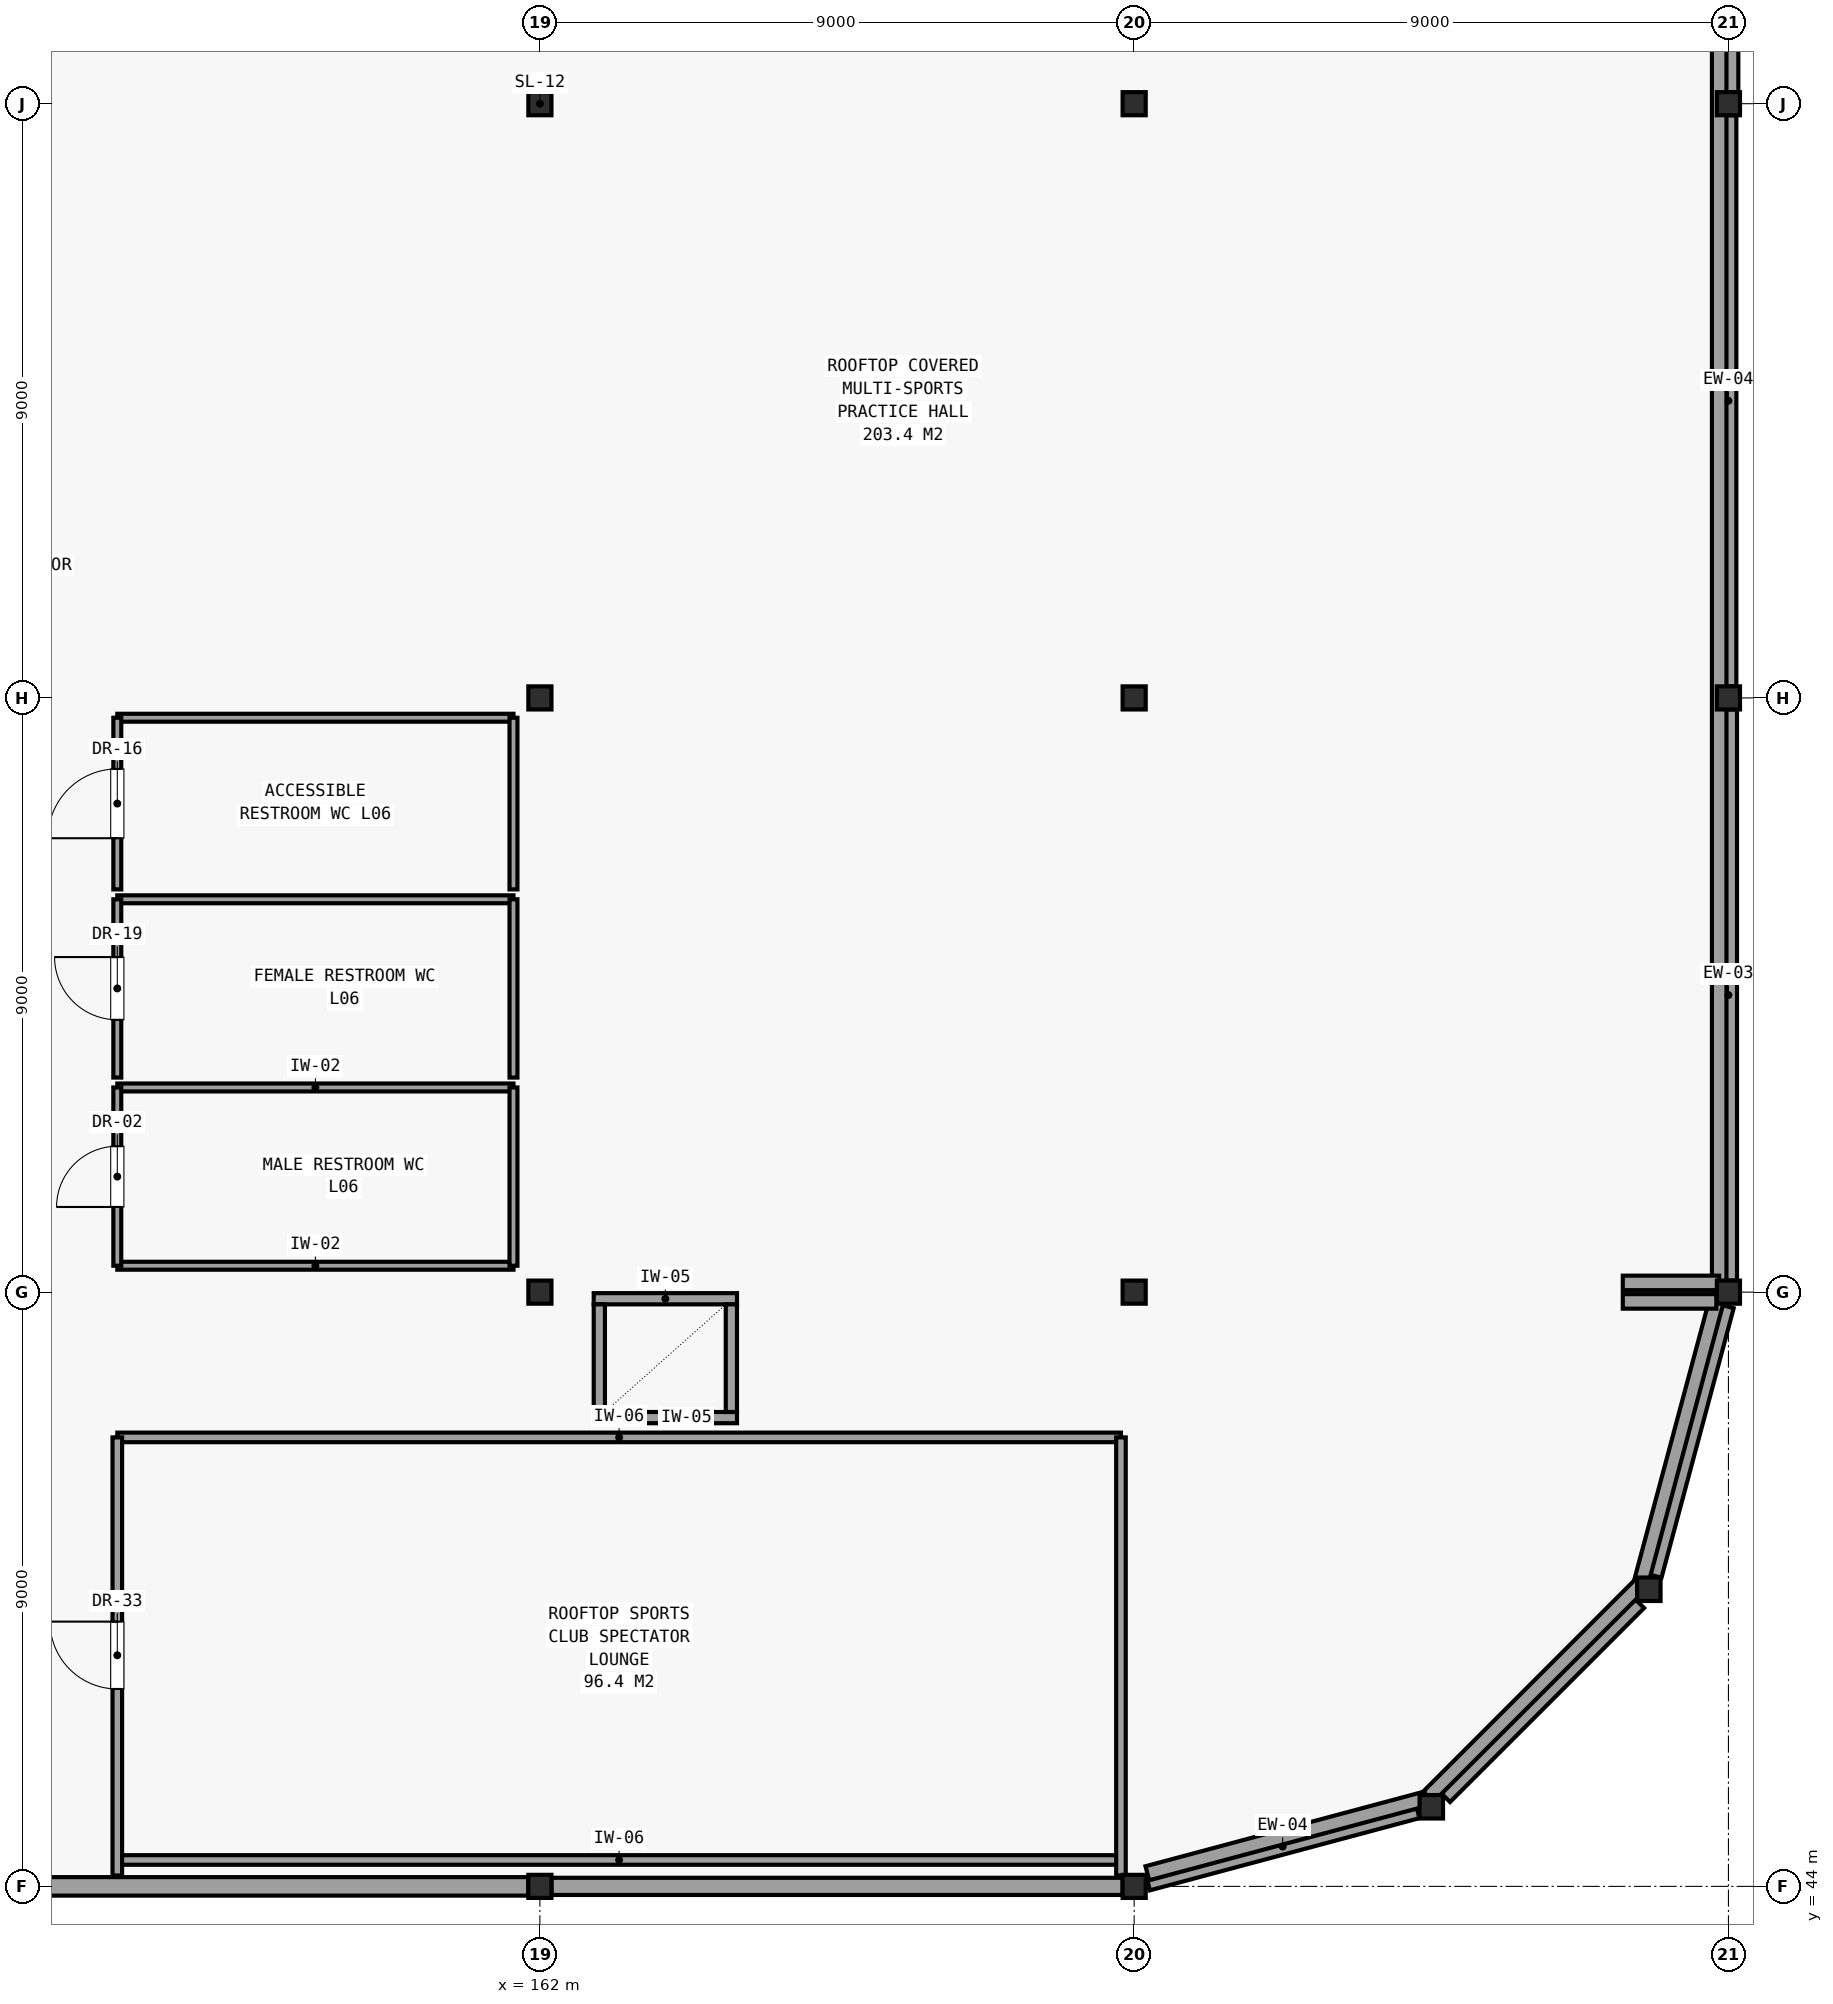
"""IFC4 building model, lengths in metres.
Left out: names, types, materials, properties, quantities, classifications, styles, units other than length and angle.
Written with IfcOpenShell. Run it as: python <this file> out.ifc"""

import sys

from ifc_helpers import new_model, si_unit, direction, frame, frame_2d, origin, origin_2d, place, context, subcontext, project, spatial, rectangle, hollow_rectangle, hollow_circle, extrude, element, fill, save


model = new_model("IFC4")
c1 = context("Model", 3, precision=1e-05, world=origin(), true_north=direction((0.0, 1.0)))
c2 = subcontext(c1, "Body", "Model", "MODEL_VIEW")
j1 = project(units=[si_unit("LENGTHUNIT", "METRE"), si_unit("PLANEANGLEUNIT", "RADIAN")], contexts=[c1])
p1 = place(None, origin())
s1 = spatial("IfcSite", under=j1, at=p1, CompositionType="ELEMENT")
p2 = place(p1, origin())
s2 = spatial("IfcBuilding", under=s1, at=p2, CompositionType="ELEMENT")
p3 = place(p2, frame((0.0, 0.0, 26.1)))
s3 = spatial("IfcBuildingStorey", under=s2, at=p3, CompositionType="ELEMENT", Elevation=26.1)
for number, where, z_axis, x_axis in (
    (1, (162.0, 44.0, 0.0), (0.0, 0.0, 1.0), (1.0, 0.0, 0.0)),
    (2, (162.0, 53.0, 0.0), (0.0, 0.0, 1.0), (1.0, 0.0, 0.0)),
    (3, (162.0, 62.0, 0.0), (0.0, 0.0, 1.0), (1.0, 0.0, 0.0)),
    (4, (162.0, 71.0, 0.0), (0.0, 0.0, 1.0), (1.0, 0.0, 0.0)),
    (5, (171.0, 44.0, 0.0), (0.0, 0.0, 1.0), (1.0, 0.0, 0.0)),
    (6, (171.0, 53.0, 0.0), (0.0, 0.0, 1.0), (1.0, 0.0, 0.0)),
    (7, (171.0, 62.0, 0.0), (0.0, 0.0, 1.0), (1.0, 0.0, 0.0)),
    (8, (171.0, 71.0, 0.0), (0.0, 0.0, 1.0), (1.0, 0.0, 0.0)),
):
    element("IfcColumn", number, at=place(p3, frame(where, z_axis=z_axis, x_axis=x_axis)), inside=s3, PredefinedType="COLUMN", context=c2, shape_type="SweptSolid", body=[
        extrude(hollow_rectangle(XDim=0.35, YDim=0.35, WallThickness=0.016, at=origin_2d()), origin(), (0.0, 0.0, 1.0), 4.14),
    ])
for number, where, z_axis, x_axis in (
    (9, (175.5, 45.206, 0.0), (0.0, 0.0, 1.0), (1.0, 0.0, 0.0)),
    (10, (178.794, 48.5, 0.0), (0.0, 0.0, 1.0), (1.0, 0.0, 0.0)),
):
    element("IfcColumn", number, at=place(p3, frame(where, z_axis=z_axis, x_axis=x_axis)), inside=s3, PredefinedType="COLUMN", context=c2, shape_type="SweptSolid", body=[
        extrude(hollow_circle(Radius=0.178, WallThickness=0.013, at=origin_2d()), origin(), (0.0, 0.0, 1.0), 4.14),
    ])
for number, where, z_axis, x_axis in (
    (11, (180.0, 53.0, 0.0), (0.0, 0.0, 1.0), (1.0, 0.0, 0.0)),
    (12, (180.0, 62.0, 0.0), (0.0, 0.0, 1.0), (1.0, 0.0, 0.0)),
    (13, (180.0, 71.0, 0.0), (0.0, 0.0, 1.0), (1.0, 0.0, 0.0)),
):
    element("IfcColumn", number, at=place(p3, frame(where, z_axis=z_axis, x_axis=x_axis)), inside=s3, PredefinedType="COLUMN", context=c2, shape_type="SweptSolid", body=[
        extrude(hollow_rectangle(XDim=0.35, YDim=0.35, WallThickness=0.016, at=origin_2d()), origin(), (0.0, 0.0, 1.0), 4.14),
    ])
p4 = place(p3, frame((153.175, 44.0, 0.0), z_axis=(0.0, 0.0, 1.0), x_axis=(1.0, 0.0, 0.0)))
e14 = element("IfcWall", 14, at=p4, inside=s3, PredefinedType="SOLIDWALL", context=c2, shape_type="SweptSolid", body=[
    extrude(rectangle(XDim=8.65, YDim=0.28, at=frame_2d((4.325, 0.0))), origin(), (0.0, 0.0, 1.0), 3.34),
])
p5 = place(p3, frame((162.175, 44.0, 0.0), z_axis=(0.0, 0.0, 1.0), x_axis=(1.0, 0.0, 0.0)))
e15 = element("IfcWall", 15, at=p5, inside=s3, PredefinedType="SOLIDWALL", context=c2, shape_type="SweptSolid", body=[
    extrude(rectangle(XDim=8.65, YDim=0.26, at=frame_2d((4.325, 0.0))), origin(), (0.0, 0.0, 1.0), 3.34),
])
p6 = place(p3, frame((171.207, 44.055, 0.0), z_axis=(0.0, 0.0, 1.0), x_axis=(0.965924589415, 0.258823661135, 0.0)))
e16 = element("IfcWall", 16, at=p6, inside=s3, PredefinedType="SOLIDWALL", context=c2, shape_type="SweptSolid", body=[
    extrude(rectangle(XDim=4.227, YDim=0.24, at=frame_2d((2.113, 0.0))), origin(), (0.0, 0.0, 1.0), 3.34),
])
p7 = place(p3, frame((175.678, 45.384, 0.0), z_axis=(0.0, 0.0, 1.0), x_axis=(0.707106781187, 0.707106781187, 0.0)))
e17 = element("IfcWall", 17, at=p7, inside=s3, PredefinedType="SOLIDWALL", context=c2, shape_type="SweptSolid", body=[
    extrude(rectangle(XDim=4.156, YDim=0.3, at=frame_2d((2.078, 0.0))), origin(), (0.0, 0.0, 1.0), 3.34),
])
p8 = place(p3, frame((178.851, 48.71, 0.0), z_axis=(0.0, 0.0, 1.0), x_axis=(0.258823661135, 0.965924589415, 0.0)))
e18 = element("IfcWall", 18, at=p8, inside=s3, PredefinedType="SOLIDWALL", context=c2, shape_type="SweptSolid", body=[
    extrude(rectangle(XDim=4.227, YDim=0.28, at=frame_2d((2.113, 0.0))), origin(), (0.0, 0.0, 1.0), 3.34),
])
p9 = place(p3, frame((180.0, 53.175, 0.0), z_axis=(0.0, 0.0, 1.0), x_axis=(0.0, 1.0, 0.0)))
e19 = element("IfcWall", 19, at=p9, inside=s3, PredefinedType="SOLIDWALL", context=c2, shape_type="SweptSolid", body=[
    extrude(rectangle(XDim=8.65, YDim=0.26, at=frame_2d((4.325, 0.0))), origin(), (0.0, 0.0, 1.0), 3.34),
])
p10 = place(p3, frame((180.0, 62.175, 0.0), z_axis=(0.0, 0.0, 1.0), x_axis=(0.0, 1.0, 0.0)))
e20 = element("IfcWall", 20, at=p10, inside=s3, PredefinedType="SOLIDWALL", context=c2, shape_type="SweptSolid", body=[
    extrude(rectangle(XDim=8.65, YDim=0.24, at=frame_2d((4.325, 0.0))), origin(), (0.0, 0.0, 1.0), 3.34),
])
p11 = place(p3, frame((180.0, 71.175, 0.0), z_axis=(0.0, 0.0, 1.0), x_axis=(0.0, 1.0, 0.0)))
e21 = element("IfcWall", 21, at=p11, inside=s3, PredefinedType="SOLIDWALL", context=c2, shape_type="SweptSolid", body=[
    extrude(rectangle(XDim=8.65, YDim=0.3, at=frame_2d((4.325, 0.0))), origin(), (0.0, 0.0, 1.0), 3.34),
])
p12 = place(p3, frame((179.817, 52.86, 4.295), z_axis=(0.0, 0.0, 1.0), x_axis=(-0.258781905852, -0.965935776956, 0.0)))
e22 = element("IfcWall", 22, at=p12, inside=s3, PredefinedType="PARAPET", context=c2, shape_type="SweptSolid", body=[
    extrude(rectangle(XDim=4.439, YDim=0.22, at=frame_2d((2.219, 0.0))), origin(), (0.0, 0.0, 1.0), 0.425),
])
p13 = place(p3, frame((178.669, 48.573, 4.295), z_axis=(0.0, 0.0, 1.0), x_axis=(-0.707106781187, -0.707106781187, 0.0)))
e23 = element("IfcWall", 23, at=p13, inside=s3, PredefinedType="PARAPET", context=c2, shape_type="SweptSolid", body=[
    extrude(rectangle(XDim=4.584, YDim=0.22, at=frame_2d((2.292, 0.0))), origin(), (0.0, 0.0, 1.0), 0.425),
])
p14 = place(p3, frame((175.427, 45.331, 4.295), z_axis=(0.0, 0.0, 1.0), x_axis=(-0.96592315171, -0.258829026561, 0.0)))
e24 = element("IfcWall", 24, at=p14, inside=s3, PredefinedType="PARAPET", context=c2, shape_type="SweptSolid", body=[
    extrude(rectangle(XDim=4.377, YDim=0.22, at=frame_2d((2.188, 0.0))), origin(), (0.0, 0.0, 1.0), 0.425),
])
p15 = place(p3, frame((178.4, 52.86, 4.295), z_axis=(0.0, 0.0, 1.0), x_axis=(1.0, 0.0, 0.0)))
e25 = element("IfcWall", 25, at=p15, inside=s3, PredefinedType="PARAPET", context=c2, shape_type="SweptSolid", body=[
    extrude(rectangle(XDim=1.417, YDim=0.22, at=frame_2d((0.709, 0.0))), origin(), (0.0, 0.0, 1.0), 0.425),
])
p16 = place(p3, frame((179.86, 88.86, 4.295), z_axis=(0.0, 0.0, 1.0), x_axis=(0.0, -1.0, 0.0)))
e26 = element("IfcWall", 26, at=p16, inside=s3, PredefinedType="PARAPET", context=c2, shape_type="SweptSolid", body=[
    extrude(rectangle(XDim=35.72, YDim=0.22, at=frame_2d((17.86, 0.0))), origin(), (0.0, 0.0, 1.0), 0.425),
])
p17 = place(p3, frame((179.86, 53.14, 4.295), z_axis=(0.0, 0.0, 1.0), x_axis=(-1.0, 0.0, 0.0)))
e27 = element("IfcWall", 27, at=p17, inside=s3, PredefinedType="PARAPET", context=c2, shape_type="SweptSolid", body=[
    extrude(rectangle(XDim=1.46, YDim=0.22, at=frame_2d((0.73, 0.0))), origin(), (0.0, 0.0, 1.0), 0.425),
])
p18 = place(p3, frame((162.815, 51.1, 0.0), z_axis=(0.0, 0.0, 1.0), x_axis=(1.0, 0.0, 0.0)))
e28 = element("IfcWall", 28, at=p18, inside=s3, PredefinedType="PARTITIONING", context=c2, shape_type="SweptSolid", body=[
    extrude(rectangle(XDim=2.17, YDim=0.17, at=frame_2d((1.085, 0.0))), origin(), (0.0, 0.0, 1.0), 3.92),
])
p19 = place(p3, frame((162.815, 52.9, 0.0), z_axis=(0.0, 0.0, 1.0), x_axis=(1.0, 0.0, 0.0)))
e29 = element("IfcWall", 29, at=p19, inside=s3, PredefinedType="PARTITIONING", context=c2, shape_type="SweptSolid", body=[
    extrude(rectangle(XDim=2.17, YDim=0.17, at=frame_2d((1.085, 0.0))), origin(), (0.0, 0.0, 1.0), 3.581),
])
for number, where, z_axis, x_axis in (
    (30, (162.9, 51.185, 0.0), (0.0, 0.0, 1.0), (0.0, 1.0, 0.0)),
    (31, (164.9, 51.185, 0.0), (0.0, 0.0, 1.0), (0.0, 1.0, 0.0)),
):
    element("IfcWall", number, at=place(p3, frame(where, z_axis=z_axis, x_axis=x_axis)), inside=s3, PredefinedType="PARTITIONING", context=c2, shape_type="SweptSolid", body=[
        extrude(rectangle(XDim=1.63, YDim=0.17, at=frame_2d((0.815, 0.0))), origin(), (0.0, 0.0, 1.0), 3.581),
    ])
for number, where, z_axis, x_axis in (
    (32, (155.6, 53.4, 0.0), (0.0, 0.0, 1.0), (1.0, 0.0, 0.0)),
    (33, (155.6, 56.1, 0.0), (0.0, 0.0, 1.0), (1.0, 0.0, 0.0)),
):
    element("IfcWall", number, at=place(p3, frame(where, z_axis=z_axis, x_axis=x_axis)), inside=s3, PredefinedType="PARTITIONING", context=c2, shape_type="SweptSolid", body=[
        extrude(rectangle(XDim=6.0, YDim=0.12, at=frame_2d((3.0, 0.0))), origin(), (0.0, 0.0, 1.0), 3.94),
    ])
p20 = place(p3, frame((155.6, 53.4, 0.0), z_axis=(0.0, 0.0, 1.0), x_axis=(0.0, 1.0, 0.0)))
e34 = element("IfcWall", 34, at=p20, inside=s3, PredefinedType="PARTITIONING", context=c2, shape_type="SweptSolid", body=[
    extrude(rectangle(XDim=2.7, YDim=0.12, at=frame_2d((1.35, 0.0))), origin(), (0.0, 0.0, 1.0), 3.94),
])
p21 = place(p20, frame((0.89, 0.0, 0.0)))
e35 = element("IfcOpeningElement", 35, at=p21, cuts=e34, PredefinedType="OPENING", context=c2, shape_type="SweptSolid", body=[
    extrude(rectangle(XDim=0.92, YDim=2.1, at=frame_2d((0.46, 1.05))), frame((0.0, 0.071, 0.0), z_axis=(0.0, -1.0, 0.0), x_axis=(1.0, 0.0, 0.0)), (0.0, 0.0, 1.0), 0.142),
])
p22 = place(p3, frame((161.6, 53.4, 0.0), z_axis=(0.0, 0.0, 1.0), x_axis=(0.0, 1.0, 0.0)))
e36 = element("IfcWall", 36, at=p22, inside=s3, PredefinedType="PARTITIONING", context=c2, shape_type="SweptSolid", body=[
    extrude(rectangle(XDim=2.7, YDim=0.12, at=frame_2d((1.35, 0.0))), origin(), (0.0, 0.0, 1.0), 3.94),
])
p23 = place(p3, frame((155.6, 58.95, 0.0), z_axis=(0.0, 0.0, 1.0), x_axis=(1.0, 0.0, 0.0)))
e37 = element("IfcWall", 37, at=p23, inside=s3, PredefinedType="PARTITIONING", context=c2, shape_type="SweptSolid", body=[
    extrude(rectangle(XDim=6.0, YDim=0.12, at=frame_2d((3.0, 0.0))), origin(), (0.0, 0.0, 1.0), 3.94),
])
p24 = place(p3, frame((155.6, 56.25, 0.0), z_axis=(0.0, 0.0, 1.0), x_axis=(0.0, 1.0, 0.0)))
e38 = element("IfcWall", 38, at=p24, inside=s3, PredefinedType="PARTITIONING", context=c2, shape_type="SweptSolid", body=[
    extrude(rectangle(XDim=2.7, YDim=0.12, at=frame_2d((1.35, 0.0))), origin(), (0.0, 0.0, 1.0), 3.94),
])
p25 = place(p24, frame((0.875, 0.0, 0.0)))
e39 = element("IfcOpeningElement", 39, at=p25, cuts=e38, PredefinedType="OPENING", context=c2, shape_type="SweptSolid", body=[
    extrude(rectangle(XDim=0.95, YDim=2.15, at=frame_2d((0.475, 1.075))), frame((0.0, 0.071, 0.0), z_axis=(0.0, -1.0, 0.0), x_axis=(1.0, 0.0, 0.0)), (0.0, 0.0, 1.0), 0.142),
])
p26 = place(p3, frame((161.6, 56.25, 0.0), z_axis=(0.0, 0.0, 1.0), x_axis=(0.0, 1.0, 0.0)))
e40 = element("IfcWall", 40, at=p26, inside=s3, PredefinedType="PARTITIONING", context=c2, shape_type="SweptSolid", body=[
    extrude(rectangle(XDim=2.7, YDim=0.12, at=frame_2d((1.35, 0.0))), origin(), (0.0, 0.0, 1.0), 3.94),
])
p27 = place(p3, frame((155.6, 61.7, 0.0), z_axis=(0.0, 0.0, 1.0), x_axis=(1.0, 0.0, 0.0)))
e41 = element("IfcWall", 41, at=p27, inside=s3, PredefinedType="PARTITIONING", context=c2, shape_type="SweptSolid", body=[
    extrude(rectangle(XDim=6.0, YDim=0.12, at=frame_2d((3.0, 0.0))), origin(), (0.0, 0.0, 1.0), 3.94),
])
p28 = place(p3, frame((155.6, 59.1, 0.0), z_axis=(0.0, 0.0, 1.0), x_axis=(0.0, 1.0, 0.0)))
e42 = element("IfcWall", 42, at=p28, inside=s3, PredefinedType="PARTITIONING", context=c2, shape_type="SweptSolid", body=[
    extrude(rectangle(XDim=2.6, YDim=0.12, at=frame_2d((1.3, 0.0))), origin(), (0.0, 0.0, 1.0), 3.94),
])
p29 = place(p28, frame((0.775, 0.0, 0.0)))
e43 = element("IfcOpeningElement", 43, at=p29, cuts=e42, PredefinedType="OPENING", context=c2, shape_type="SweptSolid", body=[
    extrude(rectangle(XDim=1.05, YDim=2.2, at=frame_2d((0.525, 1.1))), frame((0.0, 0.071, 0.0), z_axis=(0.0, -1.0, 0.0), x_axis=(1.0, 0.0, 0.0)), (0.0, 0.0, 1.0), 0.142),
])
p30 = place(p3, frame((161.6, 59.1, 0.0), z_axis=(0.0, 0.0, 1.0), x_axis=(0.0, 1.0, 0.0)))
e44 = element("IfcWall", 44, at=p30, inside=s3, PredefinedType="PARTITIONING", context=c2, shape_type="SweptSolid", body=[
    extrude(rectangle(XDim=2.6, YDim=0.12, at=frame_2d((1.3, 0.0))), origin(), (0.0, 0.0, 1.0), 3.94),
])
for number, where, z_axis, x_axis in (
    (45, (155.6, 44.4, 0.0), (0.0, 0.0, 1.0), (1.0, 0.0, 0.0)),
    (46, (155.6, 50.8, 0.0), (0.0, 0.0, 1.0), (1.0, 0.0, 0.0)),
):
    element("IfcWall", number, at=place(p3, frame(where, z_axis=z_axis, x_axis=x_axis)), inside=s3, PredefinedType="PARTITIONING", context=c2, shape_type="SweptSolid", body=[
        extrude(rectangle(XDim=15.2, YDim=0.145, at=frame_2d((7.6, 0.0))), origin(), (0.0, 0.0, 1.0), 3.94),
    ])
p31 = place(p3, frame((155.6, 44.165, 0.0), z_axis=(0.0, 0.0, 1.0), x_axis=(0.0, 1.0, 0.0)))
e47 = element("IfcWall", 47, at=p31, inside=s3, PredefinedType="PARTITIONING", context=c2, shape_type="SweptSolid", body=[
    extrude(rectangle(XDim=6.635, YDim=0.145, at=frame_2d((3.317, 0.0))), origin(), (0.0, 0.0, 1.0), 3.581),
])
p32 = place(p31, frame((2.825, 0.0, 0.0)))
e48 = element("IfcOpeningElement", 48, at=p32, cuts=e47, PredefinedType="OPENING", context=c2, shape_type="SweptSolid", body=[
    extrude(rectangle(XDim=1.02, YDim=2.25, at=frame_2d((0.51, 1.125))), frame((0.0, 0.083, 0.0), z_axis=(0.0, -1.0, 0.0), x_axis=(1.0, 0.0, 0.0)), (0.0, 0.0, 1.0), 0.167),
])
p33 = place(p3, frame((170.8, 44.165, 0.0), z_axis=(0.0, 0.0, 1.0), x_axis=(0.0, 1.0, 0.0)))
e49 = element("IfcWall", 49, at=p33, inside=s3, PredefinedType="PARTITIONING", context=c2, shape_type="SweptSolid", body=[
    extrude(rectangle(XDim=6.635, YDim=0.145, at=frame_2d((3.317, 0.0))), origin(), (0.0, 0.0, 1.0), 3.581),
])
p34 = place(p21, origin())
e50 = element("IfcDoor", 50, at=p34, inside=s3, OperationType="SINGLE_SWING_LEFT", PredefinedType="DOOR", context=c2, shape_type="SweptSolid", body=[
    extrude(rectangle(XDim=0.92, YDim=2.1, at=frame_2d((0.46, 1.05))), frame((0.0, 0.025, 0.0), z_axis=(0.0, -1.0, 0.0), x_axis=(1.0, 0.0, 0.0)), (0.0, 0.0, 1.0), 0.05),
])
fill(e35, e50)
p35 = place(p25, origin())
e51 = element("IfcDoor", 51, at=p35, inside=s3, OperationType="SINGLE_SWING_RIGHT", PredefinedType="DOOR", context=c2, shape_type="SweptSolid", body=[
    extrude(rectangle(XDim=0.95, YDim=2.15, at=frame_2d((0.475, 1.075))), frame((0.0, 0.025, 0.0), z_axis=(0.0, -1.0, 0.0), x_axis=(1.0, 0.0, 0.0)), (0.0, 0.0, 1.0), 0.05),
])
fill(e39, e51)
p36 = place(p29, origin())
e52 = element("IfcDoor", 52, at=p36, inside=s3, OperationType="SINGLE_SWING_LEFT", PredefinedType="DOOR", context=c2, shape_type="SweptSolid", body=[
    extrude(rectangle(XDim=1.05, YDim=2.2, at=frame_2d((0.525, 1.1))), frame((0.0, 0.025, 0.0), z_axis=(0.0, -1.0, 0.0), x_axis=(1.0, 0.0, 0.0)), (0.0, 0.0, 1.0), 0.05),
])
fill(e43, e52)
p37 = place(p32, origin())
e53 = element("IfcDoor", 53, at=p37, inside=s3, OperationType="SINGLE_SWING_RIGHT", PredefinedType="DOOR", context=c2, shape_type="SweptSolid", body=[
    extrude(rectangle(XDim=1.02, YDim=2.25, at=frame_2d((0.51, 1.125))), frame((0.0, 0.025, 0.0), z_axis=(0.0, -1.0, 0.0), x_axis=(1.0, 0.0, 0.0)), (0.0, 0.0, 1.0), 0.05),
])
fill(e48, e53)
save(model, sys.argv[1])
